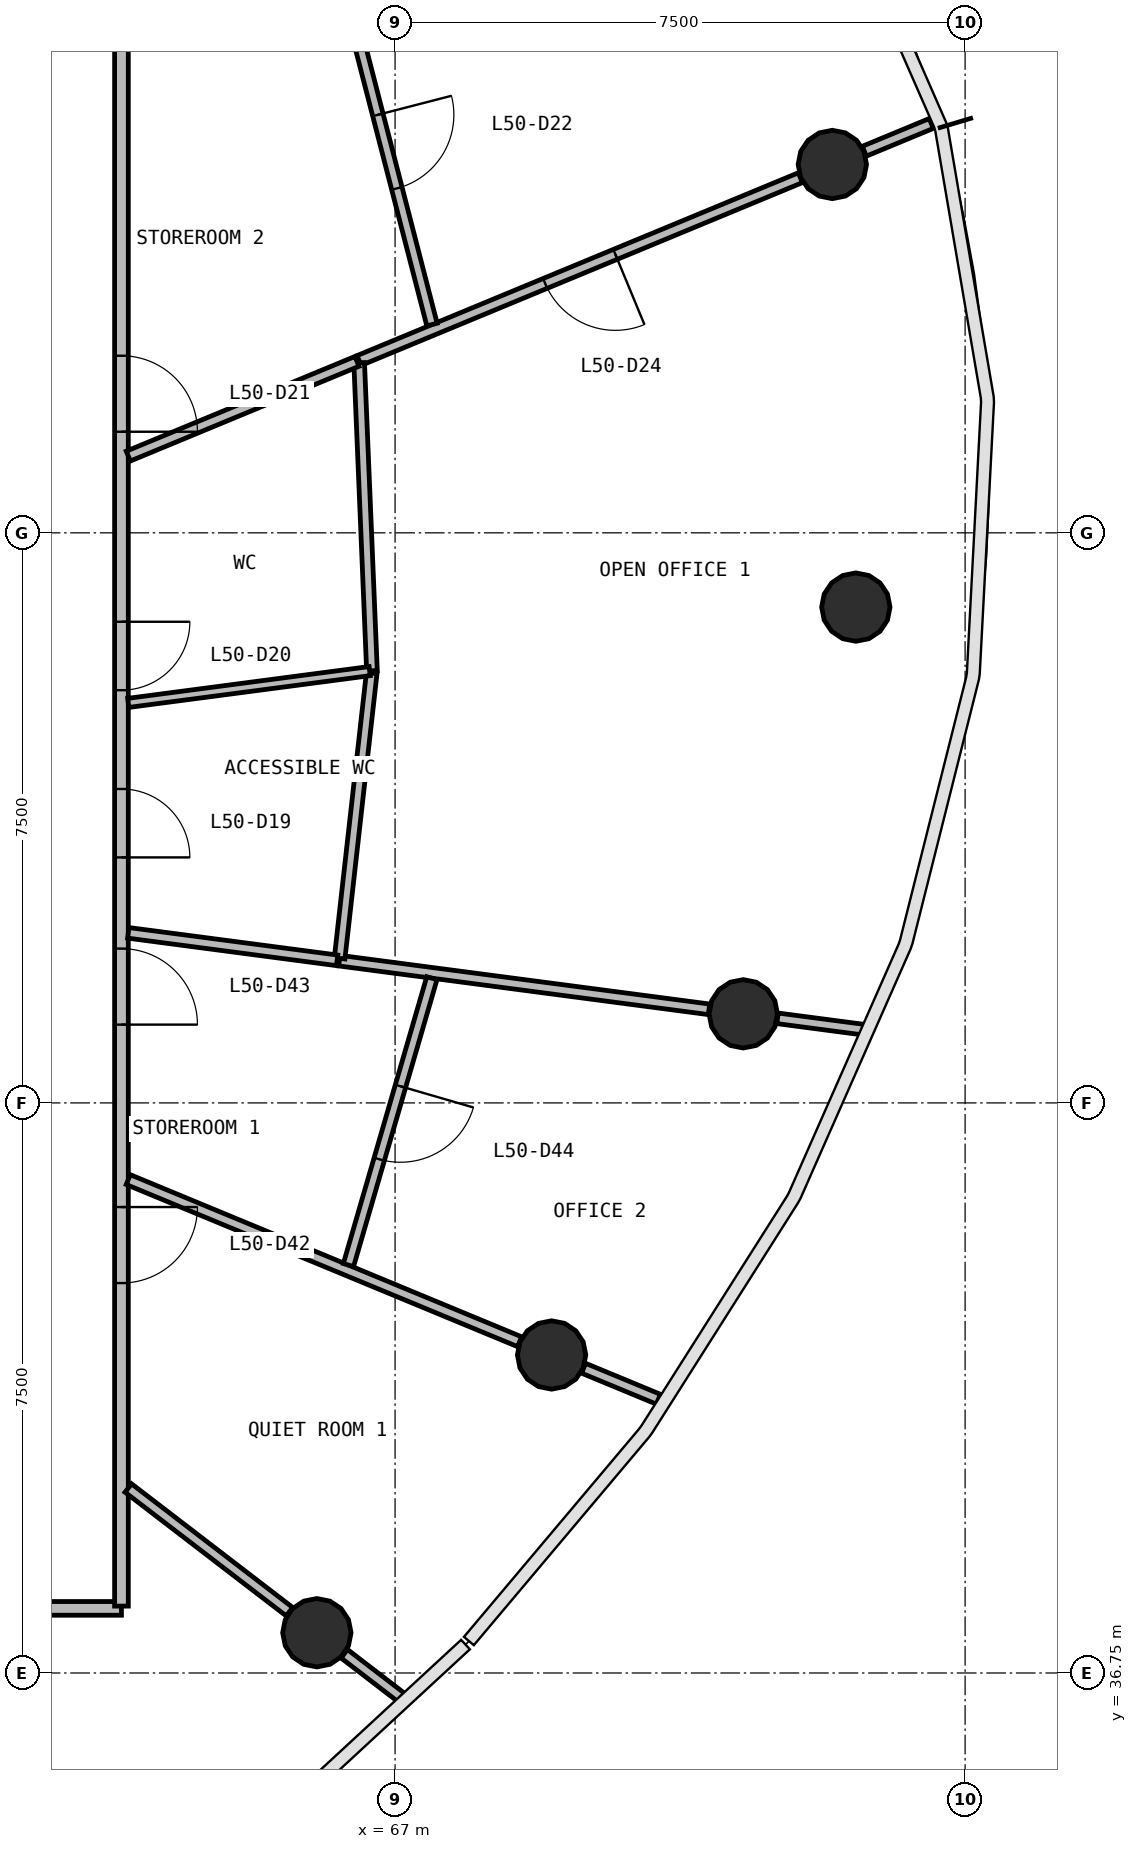
"""IFC4 building model, lengths in metres.
Left out: names, types, materials, properties, quantities, classifications, styles, units other than length and angle.
Written with IfcOpenShell. Run it as: python <this file> out.ifc"""

import sys

from ifc_helpers import new_model, si_unit, direction, frame, frame_2d, origin, origin_2d, place, context, subcontext, project, spatial, rectangle, circle, extrude, source, transform, mapped, element, fill, save


model = new_model("IFC4")
c1 = context("Model", 3, precision=1e-05, world=origin(), true_north=direction((0.0, 1.0)))
c2 = subcontext(c1, "Body", "Model", "MODEL_VIEW")
j1 = project(units=[si_unit("LENGTHUNIT", "METRE"), si_unit("PLANEANGLEUNIT", "RADIAN")], contexts=[c1])
p1 = place(None, origin())
s1 = spatial("IfcSite", under=j1, at=p1, CompositionType="ELEMENT")
p2 = place(p1, origin())
s2 = spatial("IfcBuilding", under=s1, at=p2, CompositionType="ELEMENT")
p3 = place(p2, frame((0.0, 0.0, 207.2)))
s3 = spatial("IfcBuildingStorey", under=s2, at=p3, CompositionType="ELEMENT", Elevation=207.2)
m1 = source(origin(), c2, "Body", "SweptSolid", [
    extrude(circle(Radius=0.45, at=origin_2d()), origin(), (0.0, 0.0, 1.0), 3.9),
])
for number, where, z_axis, x_axis in (
    (1, (73.062, 50.773, 0.0), (0.0, 0.0, 1.0), (1.0, 0.0, 0.0)),
    (2, (72.753, 56.596, 0.0), (0.0, 0.0, 1.0), (1.0, 0.0, 0.0)),
    (3, (65.971, 37.28, 0.0), (0.0, 0.0, 1.0), (1.0, 0.0, 0.0)),
    (4, (69.059, 40.934, 0.0), (0.0, 0.0, 1.0), (1.0, 0.0, 0.0)),
    (5, (71.581, 45.422, 0.0), (0.0, 0.0, 1.0), (1.0, 0.0, 0.0)),
):
    element("IfcColumn", number, at=place(p3, frame(where, z_axis=z_axis, x_axis=x_axis)), inside=s3, PredefinedType="COLUMN", context=c2, shape_type="MappedRepresentation", body=[
        mapped(m1, transform((0.0, 0.0, 0.0), scale=1.0)),
    ])
p4 = place(p3, frame((63.4, 37.6, 0.0), z_axis=(0.0, 0.0, 1.0), x_axis=(-1.0, 0.0, 0.0)))
e6 = element("IfcWall", 6, at=p4, inside=s3, PredefinedType="PARTITIONING", context=c2, shape_type="SweptSolid", body=[
    extrude(rectangle(XDim=22.8, YDim=0.18, at=frame_2d((11.4, 0.0))), origin(), (0.0, 0.0, 1.0), 2.88),
])
p5 = place(p4, frame((12.95, 0.0, 0.0)))
e7 = element("IfcOpeningElement", 7, at=p5, cuts=e6, PredefinedType="OPENING", context=c2, shape_type="SweptSolid", body=[
    extrude(rectangle(XDim=1.0, YDim=2.1, at=frame_2d((0.5, 1.05))), frame((0.0, 0.1, 0.0), z_axis=(0.0, -1.0, 0.0), x_axis=(1.0, 0.0, 0.0)), (0.0, 0.0, 1.0), 0.2),
])
p6 = place(p4, frame((10.95, 0.0, 0.0)))
e8 = element("IfcOpeningElement", 8, at=p6, cuts=e6, PredefinedType="OPENING", context=c2, shape_type="SweptSolid", body=[
    extrude(rectangle(XDim=1.0, YDim=2.1, at=frame_2d((0.5, 1.05))), frame((0.0, 0.1, 0.0), z_axis=(0.0, -1.0, 0.0), x_axis=(1.0, 0.0, 0.0)), (0.0, 0.0, 1.0), 0.2),
])
p7 = place(p4, frame((5.75, 0.0, 0.0)))
e9 = element("IfcOpeningElement", 9, at=p7, cuts=e6, PredefinedType="OPENING", context=c2, shape_type="SweptSolid", body=[
    extrude(rectangle(XDim=1.0, YDim=2.1, at=frame_2d((0.5, 1.05))), frame((0.0, 0.1, 0.0), z_axis=(0.0, -1.0, 0.0), x_axis=(1.0, 0.0, 0.0)), (0.0, 0.0, 1.0), 0.2),
])
p8 = place(p3, frame((63.4, 58.37, 0.0), z_axis=(0.0, 0.0, 1.0), x_axis=(0.0, -1.0, 0.0)))
e10 = element("IfcWall", 10, at=p8, inside=s3, PredefinedType="PARTITIONING", context=c2, shape_type="SweptSolid", body=[
    extrude(rectangle(XDim=20.74, YDim=0.18, at=frame_2d((10.37, 0.0))), origin(), (0.0, 0.0, 1.0), 2.88),
])
p9 = place(p8, frame((9.99, 0.0, 0.0)))
e11 = element("IfcOpeningElement", 11, at=p9, cuts=e10, PredefinedType="OPENING", context=c2, shape_type="SweptSolid", body=[
    extrude(rectangle(XDim=0.9, YDim=2.1, at=frame_2d((0.45, 1.05))), frame((0.0, 0.1, 0.0), z_axis=(0.0, -1.0, 0.0), x_axis=(1.0, 0.0, 0.0)), (0.0, 0.0, 1.0), 0.2),
])
p10 = place(p8, frame((7.79, 0.0, 0.0)))
e12 = element("IfcOpeningElement", 12, at=p10, cuts=e10, PredefinedType="OPENING", context=c2, shape_type="SweptSolid", body=[
    extrude(rectangle(XDim=0.9, YDim=2.1, at=frame_2d((0.45, 1.05))), frame((0.0, 0.1, 0.0), z_axis=(0.0, -1.0, 0.0), x_axis=(1.0, 0.0, 0.0)), (0.0, 0.0, 1.0), 0.2),
])
p11 = place(p8, frame((4.29, 0.0, 0.0)))
e13 = element("IfcOpeningElement", 13, at=p11, cuts=e10, PredefinedType="OPENING", context=c2, shape_type="SweptSolid", body=[
    extrude(rectangle(XDim=1.0, YDim=2.1, at=frame_2d((0.5, 1.05))), frame((0.0, 0.1, 0.0), z_axis=(0.0, -1.0, 0.0), x_axis=(1.0, 0.0, 0.0)), (0.0, 0.0, 1.0), 0.2),
])
p12 = place(p8, frame((15.49, 0.0, 0.0)))
e14 = element("IfcOpeningElement", 14, at=p12, cuts=e10, PredefinedType="OPENING", context=c2, shape_type="SweptSolid", body=[
    extrude(rectangle(XDim=1.0, YDim=2.1, at=frame_2d((0.5, 1.05))), frame((0.0, 0.1, 0.0), z_axis=(0.0, -1.0, 0.0), x_axis=(1.0, 0.0, 0.0)), (0.0, 0.0, 1.0), 0.2),
])
p13 = place(p8, frame((12.09, 0.0, 0.0)))
e15 = element("IfcOpeningElement", 15, at=p13, cuts=e10, PredefinedType="OPENING", context=c2, shape_type="SweptSolid", body=[
    extrude(rectangle(XDim=1.0, YDim=2.1, at=frame_2d((0.5, 1.05))), frame((0.0, 0.1, 0.0), z_axis=(0.0, -1.0, 0.0), x_axis=(1.0, 0.0, 0.0)), (0.0, 0.0, 1.0), 0.2),
])
p14 = place(p3, frame((72.333, 56.422, 0.0), z_axis=(0.0, 0.0, 1.0), x_axis=(-0.92388853292, -0.382661702733, 0.0)))
e16 = element("IfcWall", 16, at=p14, inside=s3, PredefinedType="PARTITIONING", context=c2, shape_type="SweptSolid", body=[
    extrude(rectangle(XDim=6.285, YDim=0.14, at=frame_2d((3.143, 0.0))), origin(), (0.0, 0.0, 1.0), 2.88),
])
p15 = place(p14, frame((2.635, 0.0, 0.0)))
e17 = element("IfcOpeningElement", 17, at=p15, cuts=e16, PredefinedType="OPENING", context=c2, shape_type="SweptSolid", body=[
    extrude(rectangle(XDim=1.0, YDim=2.1, at=frame_2d((0.5, 1.05))), frame((0.0, 0.08, 0.0), z_axis=(0.0, -1.0, 0.0), x_axis=(1.0, 0.0, 0.0)), (0.0, 0.0, 1.0), 0.16),
])
p16 = place(p3, frame((68.639, 41.108, 0.0), z_axis=(0.0, 0.0, 1.0), x_axis=(-0.9238758778, 0.382692255499, 0.0)))
e18 = element("IfcWall", 18, at=p16, inside=s3, PredefinedType="PARTITIONING", context=c2, shape_type="SweptSolid", body=[
    extrude(rectangle(XDim=5.573, YDim=0.14, at=frame_2d((2.787, 0.0))), origin(), (0.0, 0.0, 1.0), 2.88),
])
p17 = place(p3, frame((66.267, 46.122, 0.0), z_axis=(0.0, 0.0, 1.0), x_axis=(0.991448195842, -0.130500861923, 0.0)))
e19 = element("IfcWall", 19, at=p17, inside=s3, PredefinedType="PARTITIONING", context=c2, shape_type="SweptSolid", body=[
    extrude(rectangle(XDim=4.905, YDim=0.14, at=frame_2d((2.453, 0.0))), origin(), (0.0, 0.0, 1.0), 2.88),
])
p18 = place(p3, frame((66.324, 58.991, 0.0), z_axis=(0.0, 0.0, 1.0), x_axis=(0.249819251726, -0.968292487561, 0.0)))
e20 = element("IfcWall", 20, at=p18, inside=s3, PredefinedType="PARTITIONING", context=c2, shape_type="SweptSolid", body=[
    extrude(rectangle(XDim=4.649, YDim=0.14, at=frame_2d((2.324, 0.0))), origin(), (0.0, 0.0, 1.0), 2.88),
])
p19 = place(p18, frame((1.799, 0.0, 0.0)))
e21 = element("IfcOpeningElement", 21, at=p19, cuts=e20, PredefinedType="OPENING", context=c2, shape_type="SweptSolid", body=[
    extrude(rectangle(XDim=1.0, YDim=2.1, at=frame_2d((0.5, 1.05))), frame((0.0, 0.08, 0.0), z_axis=(0.0, -1.0, 0.0), x_axis=(1.0, 0.0, 0.0)), (0.0, 0.0, 1.0), 0.16),
])
p20 = place(p3, frame((66.696, 49.935, 0.0), z_axis=(0.0, 0.0, 1.0), x_axis=(-0.041535399008, 0.999137032959, 0.0)))
e22 = element("IfcWall", 22, at=p20, inside=s3, PredefinedType="PARTITIONING", context=c2, shape_type="SweptSolid", body=[
    extrude(rectangle(XDim=4.056, YDim=0.14, at=frame_2d((2.028, 0.0))), origin(), (0.0, 0.0, 1.0), 2.88),
])
p21 = place(p3, frame((67.484, 45.891, 0.0), z_axis=(0.0, 0.0, 1.0), x_axis=(-0.279262901939, -0.960214679955, 0.0)))
e23 = element("IfcWall", 23, at=p21, inside=s3, PredefinedType="PARTITIONING", context=c2, shape_type="SweptSolid", body=[
    extrude(rectangle(XDim=3.931, YDim=0.14, at=frame_2d((1.965, 0.0))), origin(), (0.0, 0.0, 1.0), 2.88),
])
p22 = place(p21, frame((1.481, 0.0, 0.0)))
e24 = element("IfcOpeningElement", 24, at=p22, cuts=e23, PredefinedType="OPENING", context=c2, shape_type="SweptSolid", body=[
    extrude(rectangle(XDim=1.0, YDim=2.1, at=frame_2d((0.5, 1.05))), frame((0.0, 0.08, 0.0), z_axis=(0.0, -1.0, 0.0), x_axis=(1.0, 0.0, 0.0)), (0.0, 0.0, 1.0), 0.16),
])
p23 = place(p3, frame((66.271, 46.152, 0.0), z_axis=(0.0, 0.0, 1.0), x_axis=(0.111758070994, 0.993735444456, 0.0)))
e25 = element("IfcWall", 25, at=p23, inside=s3, PredefinedType="PARTITIONING", context=c2, shape_type="SweptSolid", body=[
    extrude(rectangle(XDim=3.777, YDim=0.14, at=frame_2d((1.889, 0.0))), origin(), (0.0, 0.0, 1.0), 2.88),
])
p24 = place(p3, frame((63.49, 52.759, 0.0), z_axis=(0.0, 0.0, 1.0), x_axis=(0.923862401464, 0.382724787753, 0.0)))
e26 = element("IfcWall", 26, at=p24, inside=s3, PredefinedType="PARTITIONING", context=c2, shape_type="SweptSolid", body=[
    extrude(rectangle(XDim=3.257, YDim=0.14, at=frame_2d((1.628, 0.0))), origin(), (0.0, 0.0, 1.0), 2.88),
])
p25 = place(p3, frame((63.49, 46.487, 0.0), z_axis=(0.0, 0.0, 1.0), x_axis=(0.991438994906, -0.13057074473, 0.0)))
e27 = element("IfcWall", 27, at=p25, inside=s3, PredefinedType="PARTITIONING", context=c2, shape_type="SweptSolid", body=[
    extrude(rectangle(XDim=2.771, YDim=0.14, at=frame_2d((1.385, 0.0))), origin(), (0.0, 0.0, 1.0), 2.88),
])
p26 = place(p3, frame((63.49, 39.183, 0.0), z_axis=(0.0, 0.0, 1.0), x_axis=(0.793363703091, -0.608747923707, 0.0)))
e28 = element("IfcWall", 28, at=p26, inside=s3, PredefinedType="PARTITIONING", context=c2, shape_type="SweptSolid", body=[
    extrude(rectangle(XDim=2.673, YDim=0.14, at=frame_2d((1.336, 0.0))), origin(), (0.0, 0.0, 1.0), 2.88),
])
p27 = place(p3, frame((72.031, 45.363, 0.0), z_axis=(0.0, 0.0, 1.0), x_axis=(0.99143621724, -0.130591834141, 0.0)))
e29 = element("IfcWall", 29, at=p27, inside=s3, PredefinedType="PARTITIONING", context=c2, shape_type="SweptSolid", body=[
    extrude(rectangle(XDim=1.15, YDim=0.14, at=frame_2d((0.575, 0.0))), origin(), (0.0, 0.0, 1.0), 2.88),
])
p28 = place(p3, frame((70.464, 40.352, 0.0), z_axis=(0.0, 0.0, 1.0), x_axis=(-0.923921911664, 0.382581104012, 0.0)))
e30 = element("IfcWall", 30, at=p28, inside=s3, PredefinedType="PARTITIONING", context=c2, shape_type="SweptSolid", body=[
    extrude(rectangle(XDim=1.066, YDim=0.14, at=frame_2d((0.533, 0.0))), origin(), (0.0, 0.0, 1.0), 2.88),
])
p29 = place(p3, frame((73.174, 56.77, 0.0), z_axis=(0.0, 0.0, 1.0), x_axis=(0.923779659408, 0.38292445843, 0.0)))
e31 = element("IfcWall", 31, at=p29, inside=s3, PredefinedType="PARTITIONING", context=c2, shape_type="SweptSolid", body=[
    extrude(rectangle(XDim=0.954, YDim=0.14, at=frame_2d((0.477, 0.0))), origin(), (0.0, 0.0, 1.0), 2.88),
])
p30 = place(p3, frame((66.332, 37.003, 0.0), z_axis=(0.0, 0.0, 1.0), x_axis=(0.793344167197, -0.608773383431, 0.0)))
e32 = element("IfcWall", 32, at=p30, inside=s3, PredefinedType="PARTITIONING", context=c2, shape_type="SweptSolid", body=[
    extrude(rectangle(XDim=0.944, YDim=0.14, at=frame_2d((0.472, 0.0))), origin(), (0.0, 0.0, 1.0), 2.88),
])
p31 = place(p3, frame((63.49, 49.513, 0.0), z_axis=(0.0, 0.0, 1.0), x_axis=(0.991442878973, 0.130541249168, 0.0)))
e33 = element("IfcWall", 33, at=p31, inside=s3, PredefinedType="PARTITIONING", context=c2, shape_type="SweptSolid", body=[
    extrude(rectangle(XDim=3.204, YDim=0.12, at=frame_2d((1.602, 0.0))), origin(), (0.0, 0.0, 1.0), 2.88),
])
m2 = source(origin(), c2, "Body", "SweptSolid", [
    extrude(rectangle(XDim=0.9, YDim=2.1, at=frame_2d((0.45, 1.05))), frame((0.0, 0.025, 0.0), z_axis=(0.0, -1.0, 0.0), x_axis=(1.0, 0.0, 0.0)), (0.0, 0.0, 1.0), 0.05),
])
p32 = place(p9, origin())
e34 = element("IfcDoor", 34, at=p32, inside=s3, OperationType="SINGLE_SWING_RIGHT", PredefinedType="DOOR", context=c2, shape_type="MappedRepresentation", body=[
    mapped(m2, transform((0.0, 0.0, 0.0), scale=1.0)),
])
fill(e11, e34)
p33 = place(p10, origin())
e35 = element("IfcDoor", 35, at=p33, inside=s3, OperationType="SINGLE_SWING_LEFT", PredefinedType="DOOR", context=c2, shape_type="MappedRepresentation", body=[
    mapped(m2, transform((0.0, 0.0, 0.0), scale=1.0)),
])
fill(e12, e35)
m3 = source(origin(), c2, "Body", "SweptSolid", [
    extrude(rectangle(XDim=1.0, YDim=2.1, at=frame_2d((0.5, 1.05))), frame((0.0, 0.025, 0.0), z_axis=(0.0, -1.0, 0.0), x_axis=(1.0, 0.0, 0.0)), (0.0, 0.0, 1.0), 0.05),
])
p34 = place(p11, origin())
e36 = element("IfcDoor", 36, at=p34, inside=s3, OperationType="SINGLE_SWING_RIGHT", PredefinedType="DOOR", context=c2, shape_type="MappedRepresentation", body=[
    mapped(m3, transform((0.0, 0.0, 0.0), scale=1.0)),
])
fill(e13, e36)
p35 = place(p19, origin())
e37 = element("IfcDoor", 37, at=p35, inside=s3, OperationType="SINGLE_SWING_LEFT", PredefinedType="DOOR", context=c2, shape_type="MappedRepresentation", body=[
    mapped(m3, transform((0.0, 0.0, 0.0), scale=1.0)),
])
fill(e21, e37)
p36 = place(p15, origin())
e38 = element("IfcDoor", 38, at=p36, inside=s3, OperationType="SINGLE_SWING_LEFT", PredefinedType="DOOR", context=c2, shape_type="MappedRepresentation", body=[
    mapped(m3, transform((0.0, 0.0, 0.0), scale=1.0)),
])
fill(e17, e38)
p37 = place(p12, origin())
e39 = element("IfcDoor", 39, at=p37, inside=s3, OperationType="SINGLE_SWING_LEFT", PredefinedType="DOOR", context=c2, shape_type="MappedRepresentation", body=[
    mapped(m3, transform((0.0, 0.0, 0.0), scale=1.0)),
])
fill(e14, e39)
p38 = place(p13, origin())
e40 = element("IfcDoor", 40, at=p38, inside=s3, OperationType="SINGLE_SWING_RIGHT", PredefinedType="DOOR", context=c2, shape_type="MappedRepresentation", body=[
    mapped(m3, transform((0.0, 0.0, 0.0), scale=1.0)),
])
fill(e15, e40)
p39 = place(p22, origin())
e41 = element("IfcDoor", 41, at=p39, inside=s3, OperationType="SINGLE_SWING_LEFT", PredefinedType="DOOR", context=c2, shape_type="MappedRepresentation", body=[
    mapped(m3, transform((0.0, 0.0, 0.0), scale=1.0)),
])
fill(e24, e41)
save(model, sys.argv[1])
